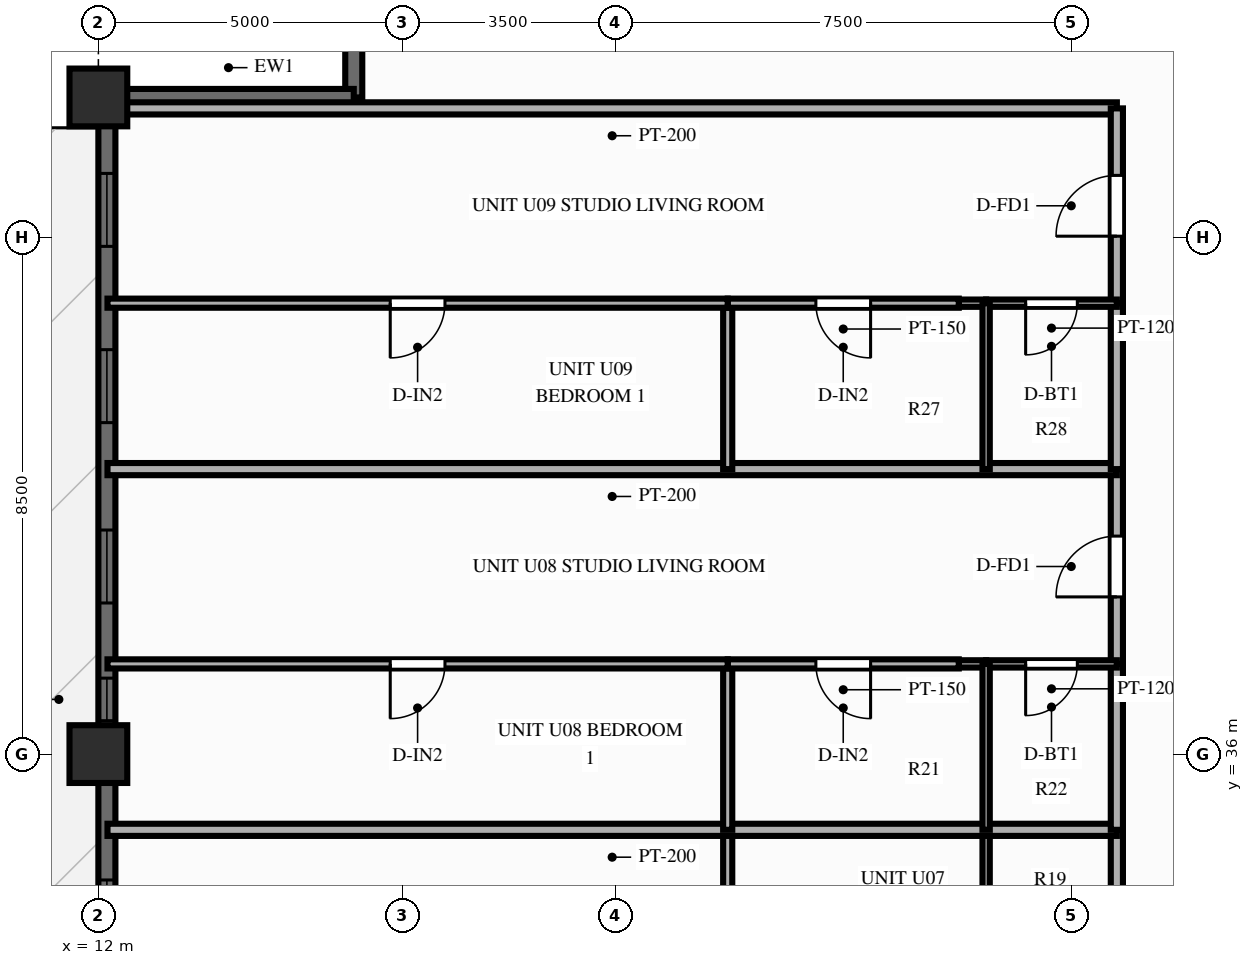
"""IFC4 building model, lengths in metres.
Left out: names, types, materials, properties, quantities, classifications, styles, units other than length and angle.
Written with IfcOpenShell. Run it as: python <this file> out.ifc"""

import sys

from ifc_helpers import new_model, si_unit, direction, frame, frame_2d, origin, origin_2d, place, context, subcontext, project, spatial, rectangle, extrude, source, transform, mapped, element, fill, save


model = new_model("IFC4")
c1 = context("Model", 3, precision=1e-05, world=origin(), true_north=direction((0.0, 1.0)))
c2 = subcontext(c1, "Body", "Model", "MODEL_VIEW")
j1 = project(units=[si_unit("LENGTHUNIT", "METRE"), si_unit("PLANEANGLEUNIT", "RADIAN")], contexts=[c1])
p1 = place(None, origin())
s1 = spatial("IfcSite", under=j1, at=p1, CompositionType="ELEMENT")
p2 = place(p1, origin())
s2 = spatial("IfcBuilding", under=s1, at=p2, CompositionType="ELEMENT")
p3 = place(p2, frame((0.0, 0.0, 113.85)))
s3 = spatial("IfcBuildingStorey", under=s2, at=p3, CompositionType="ELEMENT", Elevation=113.85)
m1 = source(origin(), c2, "Body", "SweptSolid", [
    extrude(rectangle(XDim=0.95, YDim=0.95, at=origin_2d()), origin(), (0.0, 0.0, 1.0), 3.0),
])
for number, where, z_axis, x_axis in (
    (1, (12.0, 46.8, 0.0), (0.0, 0.0, 1.0), (1.0, 0.0, 0.0)),
    (2, (12.0, 36.0, 0.0), (0.0, 0.0, 1.0), (1.0, 0.0, 0.0)),
):
    element("IfcColumn", number, at=place(p3, frame(where, z_axis=z_axis, x_axis=x_axis)), inside=s3, PredefinedType="COLUMN", context=c2, shape_type="MappedRepresentation", body=[
        mapped(m1, transform((0.0, 0.0, 0.0), scale=1.0)),
    ])
p4 = place(p3, frame((12.14, 7.2, 0.0), z_axis=(0.0, 0.0, 1.0), x_axis=(0.0, 1.0, 0.0)))
e3 = element("IfcWall", 3, at=p4, inside=s3, PredefinedType="SOLIDWALL", context=c2, shape_type="SweptSolid", body=[
    extrude(rectangle(XDim=39.6, YDim=0.28, at=frame_2d((19.8, 0.0))), origin(), (0.0, 0.0, 1.0), 2.28),
])
p5 = place(p4, frame((0.945, 0.0, 0.25)))
e4 = element("IfcOpeningElement", 4, at=p5, cuts=e3, PredefinedType="OPENING", context=c2, shape_type="SweptSolid", body=[
    extrude(rectangle(XDim=1.2, YDim=1.5, at=frame_2d((0.6, 0.75))), frame((0.0, 0.152, 0.0), z_axis=(0.0, -1.0, 0.0), x_axis=(1.0, 0.0, 0.0)), (0.0, 0.0, 1.0), 0.304),
])
p6 = place(p4, frame((4.213, 0.0, 0.25)))
e5 = element("IfcOpeningElement", 5, at=p6, cuts=e3, PredefinedType="OPENING", context=c2, shape_type="SweptSolid", body=[
    extrude(rectangle(XDim=1.2, YDim=1.5, at=frame_2d((0.6, 0.75))), frame((0.0, 0.152, 0.0), z_axis=(0.0, -1.0, 0.0), x_axis=(1.0, 0.0, 0.0)), (0.0, 0.0, 1.0), 0.304),
])
p7 = place(p4, frame((7.55, 0.0, 0.25)))
e6 = element("IfcOpeningElement", 6, at=p7, cuts=e3, PredefinedType="OPENING", context=c2, shape_type="SweptSolid", body=[
    extrude(rectangle(XDim=1.2, YDim=1.5, at=frame_2d((0.6, 0.75))), frame((0.0, 0.152, 0.0), z_axis=(0.0, -1.0, 0.0), x_axis=(1.0, 0.0, 0.0)), (0.0, 0.0, 1.0), 0.304),
])
p8 = place(p4, frame((13.483, 0.0, 0.25)))
e7 = element("IfcOpeningElement", 7, at=p8, cuts=e3, PredefinedType="OPENING", context=c2, shape_type="SweptSolid", body=[
    extrude(rectangle(XDim=1.2, YDim=1.5, at=frame_2d((0.6, 0.75))), frame((0.0, 0.152, 0.0), z_axis=(0.0, -1.0, 0.0), x_axis=(1.0, 0.0, 0.0)), (0.0, 0.0, 1.0), 0.304),
])
p9 = place(p4, frame((16.82, 0.0, 0.25)))
e8 = element("IfcOpeningElement", 8, at=p9, cuts=e3, PredefinedType="OPENING", context=c2, shape_type="SweptSolid", body=[
    extrude(rectangle(XDim=1.2, YDim=1.5, at=frame_2d((0.6, 0.75))), frame((0.0, 0.152, 0.0), z_axis=(0.0, -1.0, 0.0), x_axis=(1.0, 0.0, 0.0)), (0.0, 0.0, 1.0), 0.304),
])
p10 = place(p4, frame((19.2, 0.0, 0.25)))
e9 = element("IfcOpeningElement", 9, at=p10, cuts=e3, PredefinedType="OPENING", context=c2, shape_type="SweptSolid", body=[
    extrude(rectangle(XDim=1.2, YDim=1.5, at=frame_2d((0.6, 0.75))), frame((0.0, 0.152, 0.0), z_axis=(0.0, -1.0, 0.0), x_axis=(1.0, 0.0, 0.0)), (0.0, 0.0, 1.0), 0.304),
])
p11 = place(p4, frame((21.992, 0.0, 0.0)))
e10 = element("IfcOpeningElement", 10, at=p11, cuts=e3, PredefinedType="OPENING", context=c2, shape_type="SweptSolid", body=[
    extrude(rectangle(XDim=1.6, YDim=2.15, at=frame_2d((0.8, 1.075))), frame((0.0, 0.152, 0.0), z_axis=(0.0, -1.0, 0.0), x_axis=(1.0, 0.0, 0.0)), (0.0, 0.0, 1.0), 0.304),
])
p12 = place(p4, frame((25.529, 0.0, 0.25)))
e11 = element("IfcOpeningElement", 11, at=p12, cuts=e3, PredefinedType="OPENING", context=c2, shape_type="SweptSolid", body=[
    extrude(rectangle(XDim=1.2, YDim=1.5, at=frame_2d((0.6, 0.75))), frame((0.0, 0.152, 0.0), z_axis=(0.0, -1.0, 0.0), x_axis=(1.0, 0.0, 0.0)), (0.0, 0.0, 1.0), 0.304),
])
p13 = place(p4, frame((29.349, 0.0, 0.25)))
e12 = element("IfcOpeningElement", 12, at=p13, cuts=e3, PredefinedType="OPENING", context=c2, shape_type="SweptSolid", body=[
    extrude(rectangle(XDim=0.7, YDim=1.5, at=frame_2d((0.35, 0.75))), frame((0.0, 0.152, 0.0), z_axis=(0.0, -1.0, 0.0), x_axis=(1.0, 0.0, 0.0)), (0.0, 0.0, 1.0), 0.304),
])
p14 = place(p4, frame((31.285, 0.0, 0.25)))
e13 = element("IfcOpeningElement", 13, at=p14, cuts=e3, PredefinedType="OPENING", context=c2, shape_type="SweptSolid", body=[
    extrude(rectangle(XDim=1.2, YDim=1.5, at=frame_2d((0.6, 0.75))), frame((0.0, 0.152, 0.0), z_axis=(0.0, -1.0, 0.0), x_axis=(1.0, 0.0, 0.0)), (0.0, 0.0, 1.0), 0.304),
])
p15 = place(p4, frame((34.252, 0.0, 0.25)))
e14 = element("IfcOpeningElement", 14, at=p15, cuts=e3, PredefinedType="OPENING", context=c2, shape_type="SweptSolid", body=[
    extrude(rectangle(XDim=1.2, YDim=1.5, at=frame_2d((0.6, 0.75))), frame((0.0, 0.152, 0.0), z_axis=(0.0, -1.0, 0.0), x_axis=(1.0, 0.0, 0.0)), (0.0, 0.0, 1.0), 0.304),
])
p16 = place(p4, frame((37.151, 0.0, 0.25)))
e15 = element("IfcOpeningElement", 15, at=p16, cuts=e3, PredefinedType="OPENING", context=c2, shape_type="SweptSolid", body=[
    extrude(rectangle(XDim=1.2, YDim=1.5, at=frame_2d((0.6, 0.75))), frame((0.0, 0.152, 0.0), z_axis=(0.0, -1.0, 0.0), x_axis=(1.0, 0.0, 0.0)), (0.0, 0.0, 1.0), 0.304),
])
for number, where, z_axis, x_axis in (
    (16, (16.2, 46.8, 0.0), (0.0, 0.0, 1.0), (0.0, 1.0, 0.0)),
    (17, (12.08, 46.8, 0.0), (0.0, 0.0, 1.0), (1.0, 0.0, 0.0)),
):
    element("IfcWall", number, at=place(p3, frame(where, z_axis=z_axis, x_axis=x_axis)), inside=s3, PredefinedType="SOLIDWALL", context=c2, shape_type="SweptSolid", body=[
        extrude(rectangle(XDim=4.12, YDim=0.28, at=frame_2d((2.06, 0.0))), origin(), (0.0, 0.0, 1.0), 2.28),
    ])
p17 = place(p3, frame((28.75, 46.62, 0.0), z_axis=(0.0, 0.0, 1.0), x_axis=(-1.0, 0.0, 0.0)))
e18 = element("IfcWall", 18, at=p17, inside=s3, PredefinedType="PARTITIONING", context=c2, shape_type="SweptSolid", body=[
    extrude(rectangle(XDim=16.6, YDim=0.2, at=frame_2d((8.3, 0.0))), origin(), (0.0, 0.0, 1.0), 2.79),
])
p18 = place(p3, frame((28.75, 31.904, 0.0), z_axis=(0.0, 0.0, 1.0), x_axis=(0.0, 1.0, 0.0)))
e19 = element("IfcWall", 19, at=p18, inside=s3, PredefinedType="PARTITIONING", context=c2, shape_type="SweptSolid", body=[
    extrude(rectangle(XDim=2.85, YDim=0.2, at=frame_2d((1.425, 0.0))), origin(), (0.0, 0.0, 1.0), 2.79),
])
p19 = place(p3, frame((26.6, 31.904, 0.0), z_axis=(0.0, 0.0, 1.0), x_axis=(0.0, 1.0, 0.0)))
e20 = element("IfcWall", 20, at=p19, inside=s3, PredefinedType="PARTITIONING", context=c2, shape_type="SweptSolid", body=[
    extrude(rectangle(XDim=2.85, YDim=0.12, at=frame_2d((1.425, 0.0))), origin(), (0.0, 0.0, 1.0), 2.79),
])
p20 = place(p3, frame((22.35, 31.904, 0.0), z_axis=(0.0, 0.0, 1.0), x_axis=(0.0, 1.0, 0.0)))
e21 = element("IfcWall", 21, at=p20, inside=s3, PredefinedType="PARTITIONING", context=c2, shape_type="SweptSolid", body=[
    extrude(rectangle(XDim=2.85, YDim=0.15, at=frame_2d((1.425, 0.0))), origin(), (0.0, 0.0, 1.0), 2.79),
])
p21 = place(p3, frame((28.75, 34.754, 0.0), z_axis=(0.0, 0.0, 1.0), x_axis=(-1.0, 0.0, 0.0)))
e22 = element("IfcWall", 22, at=p21, inside=s3, PredefinedType="PARTITIONING", context=c2, shape_type="SweptSolid", body=[
    extrude(rectangle(XDim=16.6, YDim=0.2, at=frame_2d((8.3, 0.0))), origin(), (0.0, 0.0, 1.0), 2.79),
])
p22 = place(p3, frame((28.75, 34.754, 0.0), z_axis=(0.0, 0.0, 1.0), x_axis=(0.0, 1.0, 0.0)))
e23 = element("IfcWall", 23, at=p22, inside=s3, PredefinedType="PARTITIONING", context=c2, shape_type="SweptSolid", body=[
    extrude(rectangle(XDim=2.729, YDim=0.2, at=frame_2d((1.365, 0.0))), origin(), (0.0, 0.0, 1.0), 2.79),
])
p23 = place(p3, frame((28.75, 37.483, 0.0), z_axis=(0.0, 0.0, 1.0), x_axis=(0.0, 1.0, 0.0)))
e24 = element("IfcWall", 24, at=p23, inside=s3, PredefinedType="PARTITIONING", context=c2, shape_type="SweptSolid", body=[
    extrude(rectangle(XDim=3.204, YDim=0.2, at=frame_2d((1.602, 0.0))), origin(), (0.0, 0.0, 1.0), 2.79),
])
p24 = place(p23, frame((1.102, 0.0, 0.0)))
e25 = element("IfcOpeningElement", 25, at=p24, cuts=e24, PredefinedType="OPENING", context=c2, shape_type="SweptSolid", body=[
    extrude(rectangle(XDim=1.0, YDim=2.15, at=frame_2d((0.5, 1.075))), frame((0.0, 0.112, 0.0), z_axis=(0.0, -1.0, 0.0), x_axis=(1.0, 0.0, 0.0)), (0.0, 0.0, 1.0), 0.224),
])
p25 = place(p3, frame((28.75, 37.483, 0.0), z_axis=(0.0, 0.0, 1.0), x_axis=(-1.0, 0.0, 0.0)))
e26 = element("IfcWall", 26, at=p25, inside=s3, PredefinedType="PARTITIONING", context=c2, shape_type="SweptSolid", body=[
    extrude(rectangle(XDim=2.15, YDim=0.12, at=frame_2d((1.075, 0.0))), origin(), (0.0, 0.0, 1.0), 2.79),
])
p26 = place(p25, frame((0.65, 0.0, 0.0)))
e27 = element("IfcOpeningElement", 27, at=p26, cuts=e26, PredefinedType="OPENING", context=c2, shape_type="SweptSolid", body=[
    extrude(rectangle(XDim=0.85, YDim=2.05, at=frame_2d((0.425, 1.025))), frame((0.0, 0.072, 0.0), z_axis=(0.0, -1.0, 0.0), x_axis=(1.0, 0.0, 0.0)), (0.0, 0.0, 1.0), 0.144),
])
p27 = place(p3, frame((26.6, 37.483, 0.0), z_axis=(0.0, 0.0, 1.0), x_axis=(-1.0, 0.0, 0.0)))
e28 = element("IfcWall", 28, at=p27, inside=s3, PredefinedType="PARTITIONING", context=c2, shape_type="SweptSolid", body=[
    extrude(rectangle(XDim=0.45, YDim=0.12, at=frame_2d((0.225, 0.0))), origin(), (0.0, 0.0, 1.0), 2.79),
])
p28 = place(p3, frame((26.6, 34.754, 0.0), z_axis=(0.0, 0.0, 1.0), x_axis=(0.0, 1.0, 0.0)))
e29 = element("IfcWall", 29, at=p28, inside=s3, PredefinedType="PARTITIONING", context=c2, shape_type="SweptSolid", body=[
    extrude(rectangle(XDim=2.729, YDim=0.12, at=frame_2d((1.365, 0.0))), origin(), (0.0, 0.0, 1.0), 2.79),
])
p29 = place(p3, frame((22.35, 34.754, 0.0), z_axis=(0.0, 0.0, 1.0), x_axis=(0.0, 1.0, 0.0)))
e30 = element("IfcWall", 30, at=p29, inside=s3, PredefinedType="PARTITIONING", context=c2, shape_type="SweptSolid", body=[
    extrude(rectangle(XDim=2.729, YDim=0.15, at=frame_2d((1.365, 0.0))), origin(), (0.0, 0.0, 1.0), 2.79),
])
p30 = place(p3, frame((26.15, 37.483, 0.0), z_axis=(0.0, 0.0, 1.0), x_axis=(-1.0, 0.0, 0.0)))
e31 = element("IfcWall", 31, at=p30, inside=s3, PredefinedType="PARTITIONING", context=c2, shape_type="SweptSolid", body=[
    extrude(rectangle(XDim=3.8, YDim=0.15, at=frame_2d((1.9, 0.0))), origin(), (0.0, 0.0, 1.0), 2.79),
])
p31 = place(p30, frame((1.45, 0.0, 0.0)))
e32 = element("IfcOpeningElement", 32, at=p31, cuts=e31, PredefinedType="OPENING", context=c2, shape_type="SweptSolid", body=[
    extrude(rectangle(XDim=0.9, YDim=2.1, at=frame_2d((0.45, 1.05))), frame((0.0, 0.087, 0.0), z_axis=(0.0, -1.0, 0.0), x_axis=(1.0, 0.0, 0.0)), (0.0, 0.0, 1.0), 0.174),
])
p32 = place(p3, frame((22.35, 37.483, 0.0), z_axis=(0.0, 0.0, 1.0), x_axis=(-1.0, 0.0, 0.0)))
e33 = element("IfcWall", 33, at=p32, inside=s3, PredefinedType="PARTITIONING", context=c2, shape_type="SweptSolid", body=[
    extrude(rectangle(XDim=10.2, YDim=0.15, at=frame_2d((5.1, 0.0))), origin(), (0.0, 0.0, 1.0), 2.79),
])
p33 = place(p32, frame((4.65, 0.0, 0.0)))
e34 = element("IfcOpeningElement", 34, at=p33, cuts=e33, PredefinedType="OPENING", context=c2, shape_type="SweptSolid", body=[
    extrude(rectangle(XDim=0.9, YDim=2.1, at=frame_2d((0.45, 1.05))), frame((0.0, 0.087, 0.0), z_axis=(0.0, -1.0, 0.0), x_axis=(1.0, 0.0, 0.0)), (0.0, 0.0, 1.0), 0.174),
])
p34 = place(p3, frame((28.75, 40.687, 0.0), z_axis=(0.0, 0.0, 1.0), x_axis=(-1.0, 0.0, 0.0)))
e35 = element("IfcWall", 35, at=p34, inside=s3, PredefinedType="PARTITIONING", context=c2, shape_type="SweptSolid", body=[
    extrude(rectangle(XDim=16.6, YDim=0.2, at=frame_2d((8.3, 0.0))), origin(), (0.0, 0.0, 1.0), 2.79),
])
p35 = place(p3, frame((28.75, 40.687, 0.0), z_axis=(0.0, 0.0, 1.0), x_axis=(0.0, 1.0, 0.0)))
e36 = element("IfcWall", 36, at=p35, inside=s3, PredefinedType="PARTITIONING", context=c2, shape_type="SweptSolid", body=[
    extrude(rectangle(XDim=2.729, YDim=0.2, at=frame_2d((1.365, 0.0))), origin(), (0.0, 0.0, 1.0), 2.79),
])
p36 = place(p3, frame((28.75, 43.416, 0.0), z_axis=(0.0, 0.0, 1.0), x_axis=(0.0, 1.0, 0.0)))
e37 = element("IfcWall", 37, at=p36, inside=s3, PredefinedType="PARTITIONING", context=c2, shape_type="SweptSolid", body=[
    extrude(rectangle(XDim=3.204, YDim=0.2, at=frame_2d((1.602, 0.0))), origin(), (0.0, 0.0, 1.0), 2.79),
])
p37 = place(p36, frame((1.102, 0.0, 0.0)))
e38 = element("IfcOpeningElement", 38, at=p37, cuts=e37, PredefinedType="OPENING", context=c2, shape_type="SweptSolid", body=[
    extrude(rectangle(XDim=1.0, YDim=2.15, at=frame_2d((0.5, 1.075))), frame((0.0, 0.112, 0.0), z_axis=(0.0, -1.0, 0.0), x_axis=(1.0, 0.0, 0.0)), (0.0, 0.0, 1.0), 0.224),
])
p38 = place(p3, frame((28.75, 43.416, 0.0), z_axis=(0.0, 0.0, 1.0), x_axis=(-1.0, 0.0, 0.0)))
e39 = element("IfcWall", 39, at=p38, inside=s3, PredefinedType="PARTITIONING", context=c2, shape_type="SweptSolid", body=[
    extrude(rectangle(XDim=2.15, YDim=0.12, at=frame_2d((1.075, 0.0))), origin(), (0.0, 0.0, 1.0), 2.79),
])
p39 = place(p38, frame((0.65, 0.0, 0.0)))
e40 = element("IfcOpeningElement", 40, at=p39, cuts=e39, PredefinedType="OPENING", context=c2, shape_type="SweptSolid", body=[
    extrude(rectangle(XDim=0.85, YDim=2.05, at=frame_2d((0.425, 1.025))), frame((0.0, 0.072, 0.0), z_axis=(0.0, -1.0, 0.0), x_axis=(1.0, 0.0, 0.0)), (0.0, 0.0, 1.0), 0.144),
])
p40 = place(p3, frame((26.6, 43.416, 0.0), z_axis=(0.0, 0.0, 1.0), x_axis=(-1.0, 0.0, 0.0)))
e41 = element("IfcWall", 41, at=p40, inside=s3, PredefinedType="PARTITIONING", context=c2, shape_type="SweptSolid", body=[
    extrude(rectangle(XDim=0.45, YDim=0.12, at=frame_2d((0.225, 0.0))), origin(), (0.0, 0.0, 1.0), 2.79),
])
p41 = place(p3, frame((26.6, 40.687, 0.0), z_axis=(0.0, 0.0, 1.0), x_axis=(0.0, 1.0, 0.0)))
e42 = element("IfcWall", 42, at=p41, inside=s3, PredefinedType="PARTITIONING", context=c2, shape_type="SweptSolid", body=[
    extrude(rectangle(XDim=2.729, YDim=0.12, at=frame_2d((1.365, 0.0))), origin(), (0.0, 0.0, 1.0), 2.79),
])
p42 = place(p3, frame((22.35, 40.687, 0.0), z_axis=(0.0, 0.0, 1.0), x_axis=(0.0, 1.0, 0.0)))
e43 = element("IfcWall", 43, at=p42, inside=s3, PredefinedType="PARTITIONING", context=c2, shape_type="SweptSolid", body=[
    extrude(rectangle(XDim=2.729, YDim=0.15, at=frame_2d((1.365, 0.0))), origin(), (0.0, 0.0, 1.0), 2.79),
])
p43 = place(p3, frame((26.15, 43.416, 0.0), z_axis=(0.0, 0.0, 1.0), x_axis=(-1.0, 0.0, 0.0)))
e44 = element("IfcWall", 44, at=p43, inside=s3, PredefinedType="PARTITIONING", context=c2, shape_type="SweptSolid", body=[
    extrude(rectangle(XDim=3.8, YDim=0.15, at=frame_2d((1.9, 0.0))), origin(), (0.0, 0.0, 1.0), 2.79),
])
p44 = place(p43, frame((1.45, 0.0, 0.0)))
e45 = element("IfcOpeningElement", 45, at=p44, cuts=e44, PredefinedType="OPENING", context=c2, shape_type="SweptSolid", body=[
    extrude(rectangle(XDim=0.9, YDim=2.1, at=frame_2d((0.45, 1.05))), frame((0.0, 0.087, 0.0), z_axis=(0.0, -1.0, 0.0), x_axis=(1.0, 0.0, 0.0)), (0.0, 0.0, 1.0), 0.174),
])
p45 = place(p3, frame((22.35, 43.416, 0.0), z_axis=(0.0, 0.0, 1.0), x_axis=(-1.0, 0.0, 0.0)))
e46 = element("IfcWall", 46, at=p45, inside=s3, PredefinedType="PARTITIONING", context=c2, shape_type="SweptSolid", body=[
    extrude(rectangle(XDim=10.2, YDim=0.15, at=frame_2d((5.1, 0.0))), origin(), (0.0, 0.0, 1.0), 2.79),
])
p46 = place(p45, frame((4.65, 0.0, 0.0)))
e47 = element("IfcOpeningElement", 47, at=p46, cuts=e46, PredefinedType="OPENING", context=c2, shape_type="SweptSolid", body=[
    extrude(rectangle(XDim=0.9, YDim=2.1, at=frame_2d((0.45, 1.05))), frame((0.0, 0.087, 0.0), z_axis=(0.0, -1.0, 0.0), x_axis=(1.0, 0.0, 0.0)), (0.0, 0.0, 1.0), 0.174),
])
m2 = source(origin(), c2, "Body", "SweptSolid", [
    extrude(rectangle(XDim=1.2, YDim=1.5, at=frame_2d((0.6, 0.75))), frame((0.0, 0.03, 0.0), z_axis=(0.0, -1.0, 0.0), x_axis=(1.0, 0.0, 0.0)), (0.0, 0.0, 1.0), 0.06),
])
p47 = place(p12, origin())
e48 = element("IfcWindow", 48, at=p47, inside=s3, PartitioningType="SINGLE_PANEL", PredefinedType="WINDOW", context=c2, shape_type="MappedRepresentation", body=[
    mapped(m2, transform((0.0, 0.0, 0.0), scale=1.0)),
])
fill(e11, e48)
m3 = source(origin(), c2, "Body", "SweptSolid", [
    extrude(rectangle(XDim=0.7, YDim=1.5, at=frame_2d((0.35, 0.75))), frame((0.0, 0.03, 0.0), z_axis=(0.0, -1.0, 0.0), x_axis=(1.0, 0.0, 0.0)), (0.0, 0.0, 1.0), 0.06),
])
p48 = place(p13, origin())
e49 = element("IfcWindow", 49, at=p48, inside=s3, PartitioningType="SINGLE_PANEL", PredefinedType="WINDOW", context=c2, shape_type="MappedRepresentation", body=[
    mapped(m3, transform((0.0, 0.0, 0.0), scale=1.0)),
])
fill(e12, e49)
p49 = place(p14, origin())
e50 = element("IfcWindow", 50, at=p49, inside=s3, PartitioningType="SINGLE_PANEL", PredefinedType="WINDOW", context=c2, shape_type="MappedRepresentation", body=[
    mapped(m2, transform((0.0, 0.0, 0.0), scale=1.0)),
])
fill(e13, e50)
p50 = place(p15, origin())
e51 = element("IfcWindow", 51, at=p50, inside=s3, PartitioningType="SINGLE_PANEL", PredefinedType="WINDOW", context=c2, shape_type="MappedRepresentation", body=[
    mapped(m2, transform((0.0, 0.0, 0.0), scale=1.0)),
])
fill(e14, e51)
p51 = place(p16, origin())
e52 = element("IfcWindow", 52, at=p51, inside=s3, PartitioningType="SINGLE_PANEL", PredefinedType="WINDOW", context=c2, shape_type="MappedRepresentation", body=[
    mapped(m2, transform((0.0, 0.0, 0.0), scale=1.0)),
])
fill(e15, e52)
m4 = source(origin(), c2, "Body", "SweptSolid", [
    extrude(rectangle(XDim=1.0, YDim=2.15, at=frame_2d((0.5, 1.075))), frame((0.0, 0.025, 0.0), z_axis=(0.0, -1.0, 0.0), x_axis=(1.0, 0.0, 0.0)), (0.0, 0.0, 1.0), 0.05),
])
p52 = place(p24, origin())
e53 = element("IfcDoor", 53, at=p52, inside=s3, OperationType="SINGLE_SWING_LEFT", PredefinedType="DOOR", context=c2, shape_type="MappedRepresentation", body=[
    mapped(m4, transform((0.0, 0.0, 0.0), scale=1.0)),
])
fill(e25, e53)
m5 = source(origin(), c2, "Body", "SweptSolid", [
    extrude(rectangle(XDim=0.85, YDim=2.05, at=frame_2d((0.425, 1.025))), frame((0.0, 0.025, 0.0), z_axis=(0.0, -1.0, 0.0), x_axis=(1.0, 0.0, 0.0)), (0.0, 0.0, 1.0), 0.05),
])
p53 = place(p26, origin())
e54 = element("IfcDoor", 54, at=p53, inside=s3, OperationType="SINGLE_SWING_RIGHT", PredefinedType="DOOR", context=c2, shape_type="MappedRepresentation", body=[
    mapped(m5, transform((0.0, 0.0, 0.0), scale=1.0)),
])
fill(e27, e54)
m6 = source(origin(), c2, "Body", "SweptSolid", [
    extrude(rectangle(XDim=0.9, YDim=2.1, at=frame_2d((0.45, 1.05))), frame((0.0, 0.025, 0.0), z_axis=(0.0, -1.0, 0.0), x_axis=(1.0, 0.0, 0.0)), (0.0, 0.0, 1.0), 0.05),
])
p54 = place(p31, origin())
e55 = element("IfcDoor", 55, at=p54, inside=s3, OperationType="SINGLE_SWING_LEFT", PredefinedType="DOOR", context=c2, shape_type="MappedRepresentation", body=[
    mapped(m6, transform((0.0, 0.0, 0.0), scale=1.0)),
])
fill(e32, e55)
p55 = place(p33, origin())
e56 = element("IfcDoor", 56, at=p55, inside=s3, OperationType="SINGLE_SWING_RIGHT", PredefinedType="DOOR", context=c2, shape_type="MappedRepresentation", body=[
    mapped(m6, transform((0.0, 0.0, 0.0), scale=1.0)),
])
fill(e34, e56)
p56 = place(p37, origin())
e57 = element("IfcDoor", 57, at=p56, inside=s3, OperationType="SINGLE_SWING_LEFT", PredefinedType="DOOR", context=c2, shape_type="MappedRepresentation", body=[
    mapped(m4, transform((0.0, 0.0, 0.0), scale=1.0)),
])
fill(e38, e57)
p57 = place(p39, origin())
e58 = element("IfcDoor", 58, at=p57, inside=s3, OperationType="SINGLE_SWING_RIGHT", PredefinedType="DOOR", context=c2, shape_type="MappedRepresentation", body=[
    mapped(m5, transform((0.0, 0.0, 0.0), scale=1.0)),
])
fill(e40, e58)
p58 = place(p44, origin())
e59 = element("IfcDoor", 59, at=p58, inside=s3, OperationType="SINGLE_SWING_LEFT", PredefinedType="DOOR", context=c2, shape_type="MappedRepresentation", body=[
    mapped(m6, transform((0.0, 0.0, 0.0), scale=1.0)),
])
fill(e45, e59)
p59 = place(p46, origin())
e60 = element("IfcDoor", 60, at=p59, inside=s3, OperationType="SINGLE_SWING_RIGHT", PredefinedType="DOOR", context=c2, shape_type="MappedRepresentation", body=[
    mapped(m6, transform((0.0, 0.0, 0.0), scale=1.0)),
])
fill(e47, e60)
save(model, sys.argv[1])
